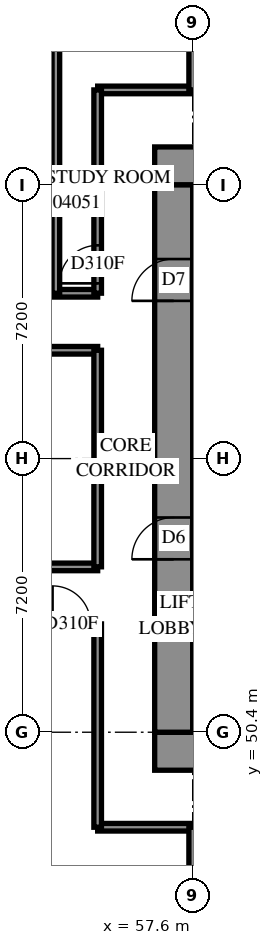
"""IFC4 building model, lengths in metres.
Left out: names, types, materials, properties, quantities, classifications, styles, units other than length and angle.
Written with IfcOpenShell. Run it as: python <this file> out.ifc"""

import sys

from ifc_helpers import new_model, si_unit, direction, frame, frame_2d, origin, place, context, subcontext, project, spatial, rectangle, extrude, element, fill, save


model = new_model("IFC4")
c1 = context("Model", 3, precision=1e-05, world=origin(), true_north=direction((0.0, 1.0)))
c2 = subcontext(c1, "Body", "Model", "MODEL_VIEW")
j1 = project(units=[si_unit("LENGTHUNIT", "METRE"), si_unit("PLANEANGLEUNIT", "RADIAN")], contexts=[c1])
p1 = place(None, origin())
s1 = spatial("IfcSite", under=j1, at=p1, CompositionType="ELEMENT")
p2 = place(p1, origin())
s2 = spatial("IfcBuilding", under=s1, at=p2, CompositionType="ELEMENT")
p3 = place(p2, frame((0.0, 0.0, 18.6)))
s3 = spatial("IfcBuildingStorey", under=s2, at=p3, CompositionType="ELEMENT", Elevation=18.6)
p4 = place(p3, frame((56.6, 49.9, -0.4), z_axis=(0.0, 0.0, 1.0), x_axis=(1.0, 0.0, 0.0)))
e1 = element("IfcWall", 1, at=p4, inside=s3, PredefinedType="SHEAR", context=c2, shape_type="SweptSolid", body=[
    extrude(rectangle(XDim=16.4, YDim=1.0, at=frame_2d((8.2, 0.0))), origin(), (0.0, 0.0, 1.0), 3.5),
])
p5 = place(p3, frame((56.6, 65.3, -0.4), z_axis=(0.0, 0.0, 1.0), x_axis=(1.0, 0.0, 0.0)))
e2 = element("IfcWall", 2, at=p5, inside=s3, PredefinedType="SHEAR", context=c2, shape_type="SweptSolid", body=[
    extrude(rectangle(XDim=16.4, YDim=1.0, at=frame_2d((8.2, 0.0))), origin(), (0.0, 0.0, 1.0), 3.5),
])
p6 = place(p5, frame((11.0, 0.0, 0.4)))
e3 = element("IfcOpeningElement", 3, at=p6, cuts=e2, PredefinedType="OPENING", context=c2, shape_type="SweptSolid", body=[
    extrude(rectangle(XDim=0.8, YDim=2.1, at=frame_2d((0.4, 1.05))), frame((0.0, 0.51, 0.0), z_axis=(0.0, -1.0, 0.0), x_axis=(1.0, 0.0, 0.0)), (0.0, 0.0, 1.0), 1.02),
])
p7 = place(p3, frame((57.1, 50.4, -0.4), z_axis=(0.0, 0.0, 1.0), x_axis=(0.0, 1.0, 0.0)))
e4 = element("IfcWall", 4, at=p7, inside=s3, PredefinedType="SHEAR", context=c2, shape_type="SweptSolid", body=[
    extrude(rectangle(XDim=14.4, YDim=1.0, at=frame_2d((7.2, 0.0))), origin(), (0.0, 0.0, 1.0), 3.5),
])
p8 = place(p7, frame((4.55, 0.0, 0.4)))
e5 = element("IfcOpeningElement", 5, at=p8, cuts=e4, PredefinedType="OPENING", context=c2, shape_type="SweptSolid", body=[
    extrude(rectangle(XDim=1.1, YDim=2.1, at=frame_2d((0.55, 1.05))), frame((0.0, 0.51, 0.0), z_axis=(0.0, -1.0, 0.0), x_axis=(1.0, 0.0, 0.0)), (0.0, 0.0, 1.0), 1.02),
])
p9 = place(p7, frame((11.35, 0.0, 0.4)))
e6 = element("IfcOpeningElement", 6, at=p9, cuts=e4, PredefinedType="OPENING", context=c2, shape_type="SweptSolid", body=[
    extrude(rectangle(XDim=1.1, YDim=2.1, at=frame_2d((0.55, 1.05))), frame((0.0, 0.51, 0.0), z_axis=(0.0, -1.0, 0.0), x_axis=(1.0, 0.0, 0.0)), (0.0, 0.0, 1.0), 1.02),
])
p10 = place(p3, frame((0.0, 53.25, 0.0), z_axis=(0.0, 0.0, 1.0), x_axis=(1.0, 0.0, 0.0)))
e7 = element("IfcWall", 7, at=p10, inside=s3, PredefinedType="PARTITIONING", context=c2, shape_type="SweptSolid", body=[
    extrude(rectangle(XDim=55.1, YDim=0.2, at=frame_2d((27.55, 0.0))), origin(), (0.0, 0.0, 1.0), 3.8),
])
p11 = place(p10, frame((8.669, 0.0, 0.0)))
e8 = element("IfcOpeningElement", 8, at=p11, cuts=e7, PredefinedType="OPENING", context=c2, shape_type="SweptSolid", body=[
    extrude(rectangle(XDim=1.0, YDim=2.1, at=frame_2d((0.5, 1.05))), frame((0.0, 0.11, 0.0), z_axis=(0.0, -1.0, 0.0), x_axis=(1.0, 0.0, 0.0)), (0.0, 0.0, 1.0), 0.22),
])
p12 = place(p10, frame((11.635, 0.0, 0.0)))
e9 = element("IfcOpeningElement", 9, at=p12, cuts=e7, PredefinedType="OPENING", context=c2, shape_type="SweptSolid", body=[
    extrude(rectangle(XDim=1.0, YDim=2.1, at=frame_2d((0.5, 1.05))), frame((0.0, 0.11, 0.0), z_axis=(0.0, -1.0, 0.0), x_axis=(1.0, 0.0, 0.0)), (0.0, 0.0, 1.0), 0.22),
])
p13 = place(p10, frame((16.165, 0.0, 0.0)))
e10 = element("IfcOpeningElement", 10, at=p13, cuts=e7, PredefinedType="OPENING", context=c2, shape_type="SweptSolid", body=[
    extrude(rectangle(XDim=1.0, YDim=2.1, at=frame_2d((0.5, 1.05))), frame((0.0, 0.11, 0.0), z_axis=(0.0, -1.0, 0.0), x_axis=(1.0, 0.0, 0.0)), (0.0, 0.0, 1.0), 0.22),
])
p14 = place(p10, frame((20.337, 0.0, 0.0)))
e11 = element("IfcOpeningElement", 11, at=p14, cuts=e7, PredefinedType="OPENING", context=c2, shape_type="SweptSolid", body=[
    extrude(rectangle(XDim=1.0, YDim=2.1, at=frame_2d((0.5, 1.05))), frame((0.0, 0.11, 0.0), z_axis=(0.0, -1.0, 0.0), x_axis=(1.0, 0.0, 0.0)), (0.0, 0.0, 1.0), 0.22),
])
p15 = place(p10, frame((27.538, 0.0, 0.0)))
e12 = element("IfcOpeningElement", 12, at=p15, cuts=e7, PredefinedType="OPENING", context=c2, shape_type="SweptSolid", body=[
    extrude(rectangle(XDim=1.0, YDim=2.1, at=frame_2d((0.5, 1.05))), frame((0.0, 0.11, 0.0), z_axis=(0.0, -1.0, 0.0), x_axis=(1.0, 0.0, 0.0)), (0.0, 0.0, 1.0), 0.22),
])
p16 = place(p10, frame((34.737, 0.0, 0.0)))
e13 = element("IfcOpeningElement", 13, at=p16, cuts=e7, PredefinedType="OPENING", context=c2, shape_type="SweptSolid", body=[
    extrude(rectangle(XDim=1.0, YDim=2.1, at=frame_2d((0.5, 1.05))), frame((0.0, 0.11, 0.0), z_axis=(0.0, -1.0, 0.0), x_axis=(1.0, 0.0, 0.0)), (0.0, 0.0, 1.0), 0.22),
])
p17 = place(p10, frame((40.125, 0.0, 0.0)))
e14 = element("IfcOpeningElement", 14, at=p17, cuts=e7, PredefinedType="OPENING", context=c2, shape_type="SweptSolid", body=[
    extrude(rectangle(XDim=1.0, YDim=2.1, at=frame_2d((0.5, 1.05))), frame((0.0, 0.11, 0.0), z_axis=(0.0, -1.0, 0.0), x_axis=(1.0, 0.0, 0.0)), (0.0, 0.0, 1.0), 0.22),
])
p18 = place(p10, frame((46.758, 0.0, 0.0)))
e15 = element("IfcOpeningElement", 15, at=p18, cuts=e7, PredefinedType="OPENING", context=c2, shape_type="SweptSolid", body=[
    extrude(rectangle(XDim=1.0, YDim=2.1, at=frame_2d((0.5, 1.05))), frame((0.0, 0.11, 0.0), z_axis=(0.0, -1.0, 0.0), x_axis=(1.0, 0.0, 0.0)), (0.0, 0.0, 1.0), 0.22),
])
p19 = place(p10, frame((53.913, 0.0, 0.0)))
e16 = element("IfcOpeningElement", 16, at=p19, cuts=e7, PredefinedType="OPENING", context=c2, shape_type="SweptSolid", body=[
    extrude(rectangle(XDim=1.0, YDim=2.1, at=frame_2d((0.5, 1.05))), frame((0.0, 0.11, 0.0), z_axis=(0.0, -1.0, 0.0), x_axis=(1.0, 0.0, 0.0)), (0.0, 0.0, 1.0), 0.22),
])
p20 = place(p10, frame((2.672, 0.0, 0.0)))
e17 = element("IfcOpeningElement", 17, at=p20, cuts=e7, PredefinedType="OPENING", context=c2, shape_type="SweptSolid", body=[
    extrude(rectangle(XDim=1.0, YDim=2.1, at=frame_2d((0.5, 1.05))), frame((0.0, 0.11, 0.0), z_axis=(0.0, -1.0, 0.0), x_axis=(1.0, 0.0, 0.0)), (0.0, 0.0, 1.0), 0.22),
])
p21 = place(p10, frame((4.788, 0.0, 0.0)))
e18 = element("IfcOpeningElement", 18, at=p21, cuts=e7, PredefinedType="OPENING", context=c2, shape_type="SweptSolid", body=[
    extrude(rectangle(XDim=1.0, YDim=2.1, at=frame_2d((0.5, 1.05))), frame((0.0, 0.11, 0.0), z_axis=(0.0, -1.0, 0.0), x_axis=(1.0, 0.0, 0.0)), (0.0, 0.0, 1.0), 0.22),
])
p22 = place(p3, frame((0.002, 60.45, 0.0), z_axis=(0.0, 0.0, 1.0), x_axis=(1.0, 0.0, 0.0)))
e19 = element("IfcWall", 19, at=p22, inside=s3, PredefinedType="PARTITIONING", context=c2, shape_type="SweptSolid", body=[
    extrude(rectangle(XDim=55.098, YDim=0.2, at=frame_2d((27.549, 0.0))), origin(), (0.0, 0.0, 1.0), 3.8),
])
p23 = place(p22, frame((49.69, 0.0, 0.0)))
e20 = element("IfcOpeningElement", 20, at=p23, cuts=e19, PredefinedType="OPENING", context=c2, shape_type="SweptSolid", body=[
    extrude(rectangle(XDim=1.0, YDim=2.1, at=frame_2d((0.5, 1.05))), frame((0.0, 0.11, 0.0), z_axis=(0.0, -1.0, 0.0), x_axis=(1.0, 0.0, 0.0)), (0.0, 0.0, 1.0), 0.22),
])
p24 = place(p22, frame((3.897, 0.0, 0.0)))
e21 = element("IfcOpeningElement", 21, at=p24, cuts=e19, PredefinedType="OPENING", context=c2, shape_type="SweptSolid", body=[
    extrude(rectangle(XDim=1.0, YDim=2.1, at=frame_2d((0.5, 1.05))), frame((0.0, 0.11, 0.0), z_axis=(0.0, -1.0, 0.0), x_axis=(1.0, 0.0, 0.0)), (0.0, 0.0, 1.0), 0.22),
])
p25 = place(p3, frame((0.002, 61.95, 0.0), z_axis=(0.0, 0.0, 1.0), x_axis=(1.0, 0.0, 0.0)))
e22 = element("IfcWall", 22, at=p25, inside=s3, PredefinedType="PARTITIONING", context=c2, shape_type="SweptSolid", body=[
    extrude(rectangle(XDim=55.098, YDim=0.2, at=frame_2d((27.549, 0.0))), origin(), (0.0, 0.0, 1.0), 3.8),
])
p26 = place(p25, frame((8.667, 0.0, 0.0)))
e23 = element("IfcOpeningElement", 23, at=p26, cuts=e22, PredefinedType="OPENING", context=c2, shape_type="SweptSolid", body=[
    extrude(rectangle(XDim=1.0, YDim=2.1, at=frame_2d((0.5, 1.05))), frame((0.0, 0.11, 0.0), z_axis=(0.0, -1.0, 0.0), x_axis=(1.0, 0.0, 0.0)), (0.0, 0.0, 1.0), 0.22),
])
p27 = place(p25, frame((13.136, 0.0, 0.0)))
e24 = element("IfcOpeningElement", 24, at=p27, cuts=e22, PredefinedType="OPENING", context=c2, shape_type="SweptSolid", body=[
    extrude(rectangle(XDim=1.0, YDim=2.1, at=frame_2d((0.5, 1.05))), frame((0.0, 0.11, 0.0), z_axis=(0.0, -1.0, 0.0), x_axis=(1.0, 0.0, 0.0)), (0.0, 0.0, 1.0), 0.22),
])
p28 = place(p25, frame((20.335, 0.0, 0.0)))
e25 = element("IfcOpeningElement", 25, at=p28, cuts=e22, PredefinedType="OPENING", context=c2, shape_type="SweptSolid", body=[
    extrude(rectangle(XDim=1.0, YDim=2.1, at=frame_2d((0.5, 1.05))), frame((0.0, 0.11, 0.0), z_axis=(0.0, -1.0, 0.0), x_axis=(1.0, 0.0, 0.0)), (0.0, 0.0, 1.0), 0.22),
])
p29 = place(p25, frame((27.535, 0.0, 0.0)))
e26 = element("IfcOpeningElement", 26, at=p29, cuts=e22, PredefinedType="OPENING", context=c2, shape_type="SweptSolid", body=[
    extrude(rectangle(XDim=1.0, YDim=2.1, at=frame_2d((0.5, 1.05))), frame((0.0, 0.11, 0.0), z_axis=(0.0, -1.0, 0.0), x_axis=(1.0, 0.0, 0.0)), (0.0, 0.0, 1.0), 0.22),
])
p30 = place(p25, frame((34.736, 0.0, 0.0)))
e27 = element("IfcOpeningElement", 27, at=p30, cuts=e22, PredefinedType="OPENING", context=c2, shape_type="SweptSolid", body=[
    extrude(rectangle(XDim=1.0, YDim=2.1, at=frame_2d((0.5, 1.05))), frame((0.0, 0.11, 0.0), z_axis=(0.0, -1.0, 0.0), x_axis=(1.0, 0.0, 0.0)), (0.0, 0.0, 1.0), 0.22),
])
p31 = place(p25, frame((41.935, 0.0, 0.0)))
e28 = element("IfcOpeningElement", 28, at=p31, cuts=e22, PredefinedType="OPENING", context=c2, shape_type="SweptSolid", body=[
    extrude(rectangle(XDim=1.0, YDim=2.1, at=frame_2d((0.5, 1.05))), frame((0.0, 0.11, 0.0), z_axis=(0.0, -1.0, 0.0), x_axis=(1.0, 0.0, 0.0)), (0.0, 0.0, 1.0), 0.22),
])
p32 = place(p25, frame((49.136, 0.0, 0.0)))
e29 = element("IfcOpeningElement", 29, at=p32, cuts=e22, PredefinedType="OPENING", context=c2, shape_type="SweptSolid", body=[
    extrude(rectangle(XDim=1.0, YDim=2.1, at=frame_2d((0.5, 1.05))), frame((0.0, 0.11, 0.0), z_axis=(0.0, -1.0, 0.0), x_axis=(1.0, 0.0, 0.0)), (0.0, 0.0, 1.0), 0.22),
])
p33 = place(p25, frame((4.799, 0.0, 0.0)))
e30 = element("IfcOpeningElement", 30, at=p33, cuts=e22, PredefinedType="OPENING", context=c2, shape_type="SweptSolid", body=[
    extrude(rectangle(XDim=1.0, YDim=2.1, at=frame_2d((0.5, 1.05))), frame((0.0, 0.11, 0.0), z_axis=(0.0, -1.0, 0.0), x_axis=(1.0, 0.0, 0.0)), (0.0, 0.0, 1.0), 0.22),
])
p34 = place(p3, frame((6.0, 54.75, 0.0), z_axis=(0.0, 0.0, 1.0), x_axis=(1.0, 0.0, 0.0)))
e31 = element("IfcWall", 31, at=p34, inside=s3, PredefinedType="PARTITIONING", context=c2, shape_type="SweptSolid", body=[
    extrude(rectangle(XDim=49.1, YDim=0.2, at=frame_2d((24.55, 0.0))), origin(), (0.0, 0.0, 1.0), 3.8),
])
p35 = place(p34, frame((6.284, 0.0, 0.0)))
e32 = element("IfcOpeningElement", 32, at=p35, cuts=e31, PredefinedType="OPENING", context=c2, shape_type="SweptSolid", body=[
    extrude(rectangle(XDim=1.0, YDim=2.1, at=frame_2d((0.5, 1.05))), frame((0.0, 0.11, 0.0), z_axis=(0.0, -1.0, 0.0), x_axis=(1.0, 0.0, 0.0)), (0.0, 0.0, 1.0), 0.22),
])
p36 = place(p34, frame((14.374, 0.0, 0.0)))
e33 = element("IfcOpeningElement", 33, at=p36, cuts=e31, PredefinedType="OPENING", context=c2, shape_type="SweptSolid", body=[
    extrude(rectangle(XDim=1.0, YDim=2.1, at=frame_2d((0.5, 1.05))), frame((0.0, 0.11, 0.0), z_axis=(0.0, -1.0, 0.0), x_axis=(1.0, 0.0, 0.0)), (0.0, 0.0, 1.0), 0.22),
])
p37 = place(p34, frame((19.725, 0.0, 0.0)))
e34 = element("IfcOpeningElement", 34, at=p37, cuts=e31, PredefinedType="OPENING", context=c2, shape_type="SweptSolid", body=[
    extrude(rectangle(XDim=1.0, YDim=2.1, at=frame_2d((0.5, 1.05))), frame((0.0, 0.11, 0.0), z_axis=(0.0, -1.0, 0.0), x_axis=(1.0, 0.0, 0.0)), (0.0, 0.0, 1.0), 0.22),
])
p38 = place(p34, frame((28.183, 0.0, 0.0)))
e35 = element("IfcOpeningElement", 35, at=p38, cuts=e31, PredefinedType="OPENING", context=c2, shape_type="SweptSolid", body=[
    extrude(rectangle(XDim=1.0, YDim=2.1, at=frame_2d((0.5, 1.05))), frame((0.0, 0.11, 0.0), z_axis=(0.0, -1.0, 0.0), x_axis=(1.0, 0.0, 0.0)), (0.0, 0.0, 1.0), 0.22),
])
p39 = place(p34, frame((35.974, 0.0, 0.0)))
e36 = element("IfcOpeningElement", 36, at=p39, cuts=e31, PredefinedType="OPENING", context=c2, shape_type="SweptSolid", body=[
    extrude(rectangle(XDim=1.0, YDim=2.1, at=frame_2d((0.5, 1.05))), frame((0.0, 0.11, 0.0), z_axis=(0.0, -1.0, 0.0), x_axis=(1.0, 0.0, 0.0)), (0.0, 0.0, 1.0), 0.22),
])
p40 = place(p3, frame((55.1, 67.3, 0.0), z_axis=(0.0, 0.0, 1.0), x_axis=(1.0, 0.0, 0.0)))
e37 = element("IfcWall", 37, at=p40, inside=s3, PredefinedType="PARTITIONING", context=c2, shape_type="SweptSolid", body=[
    extrude(rectangle(XDim=19.4, YDim=0.2, at=frame_2d((9.7, 0.0))), origin(), (0.0, 0.0, 1.0), 3.8),
])
p41 = place(p40, frame((6.058, 0.0, 0.0)))
e38 = element("IfcOpeningElement", 38, at=p41, cuts=e37, PredefinedType="OPENING", context=c2, shape_type="SweptSolid", body=[
    extrude(rectangle(XDim=1.0, YDim=2.1, at=frame_2d((0.5, 1.05))), frame((0.0, 0.11, 0.0), z_axis=(0.0, -1.0, 0.0), x_axis=(1.0, 0.0, 0.0)), (0.0, 0.0, 1.0), 0.22),
])
p42 = place(p40, frame((13.562, 0.0, 0.0)))
e39 = element("IfcOpeningElement", 39, at=p42, cuts=e37, PredefinedType="OPENING", context=c2, shape_type="SweptSolid", body=[
    extrude(rectangle(XDim=1.0, YDim=2.1, at=frame_2d((0.5, 1.05))), frame((0.0, 0.11, 0.0), z_axis=(0.0, -1.0, 0.0), x_axis=(1.0, 0.0, 0.0)), (0.0, 0.0, 1.0), 0.22),
])
p43 = place(p3, frame((55.1, 47.9, 0.0), z_axis=(0.0, 0.0, 1.0), x_axis=(1.0, 0.0, 0.0)))
e40 = element("IfcWall", 40, at=p43, inside=s3, PredefinedType="PARTITIONING", context=c2, shape_type="SweptSolid", body=[
    extrude(rectangle(XDim=19.208, YDim=0.2, at=frame_2d((9.604, 0.0))), origin(), (0.0, 0.0, 1.0), 3.8),
])
p44 = place(p43, frame((6.058, 0.0, 0.0)))
e41 = element("IfcOpeningElement", 41, at=p44, cuts=e40, PredefinedType="OPENING", context=c2, shape_type="SweptSolid", body=[
    extrude(rectangle(XDim=1.0, YDim=2.1, at=frame_2d((0.5, 1.05))), frame((0.0, 0.11, 0.0), z_axis=(0.0, -1.0, 0.0), x_axis=(1.0, 0.0, 0.0)), (0.0, 0.0, 1.0), 0.22),
])
p45 = place(p43, frame((13.258, 0.0, 0.0)))
e42 = element("IfcOpeningElement", 42, at=p45, cuts=e40, PredefinedType="OPENING", context=c2, shape_type="SweptSolid", body=[
    extrude(rectangle(XDim=1.0, YDim=2.1, at=frame_2d((0.5, 1.05))), frame((0.0, 0.11, 0.0), z_axis=(0.0, -1.0, 0.0), x_axis=(1.0, 0.0, 0.0)), (0.0, 0.0, 1.0), 0.22),
])
p46 = place(p3, frame((54.0, 61.95, 0.0), z_axis=(0.0, 0.0, 1.0), x_axis=(0.0, 1.0, 0.0)))
e43 = element("IfcWall", 43, at=p46, inside=s3, PredefinedType="PARTITIONING", context=c2, shape_type="SweptSolid", body=[
    extrude(rectangle(XDim=10.7, YDim=0.2, at=frame_2d((5.35, 0.0))), origin(), (0.0, 0.0, 1.0), 3.8),
])
p47 = place(p3, frame((55.1, 54.752, 0.0), z_axis=(0.0, 0.0, 1.0), x_axis=(0.0, 1.0, 0.0)))
e44 = element("IfcWall", 44, at=p47, inside=s3, PredefinedType="PARTITIONING", context=c2, shape_type="SweptSolid", body=[
    extrude(rectangle(XDim=5.698, YDim=0.2, at=frame_2d((2.849, 0.0))), origin(), (0.0, 0.0, 1.0), 3.8),
])
p48 = place(p3, frame((55.1, 47.9, 0.0), z_axis=(0.0, 0.0, 1.0), x_axis=(0.0, 1.0, 0.0)))
e45 = element("IfcWall", 45, at=p48, inside=s3, PredefinedType="PARTITIONING", context=c2, shape_type="SweptSolid", body=[
    extrude(rectangle(XDim=5.35, YDim=0.2, at=frame_2d((2.675, 0.0))), origin(), (0.0, 0.0, 1.0), 3.8),
])
p49 = place(p3, frame((55.1, 61.952, 0.0), z_axis=(0.0, 0.0, 1.0), x_axis=(0.0, 1.0, 0.0)))
e46 = element("IfcWall", 46, at=p49, inside=s3, PredefinedType="PARTITIONING", context=c2, shape_type="SweptSolid", body=[
    extrude(rectangle(XDim=5.348, YDim=0.2, at=frame_2d((2.674, 0.0))), origin(), (0.0, 0.0, 1.0), 3.8),
])
p50 = place(p49, frame((0.259, 0.0, 0.0)))
e47 = element("IfcOpeningElement", 47, at=p50, cuts=e46, PredefinedType="OPENING", context=c2, shape_type="SweptSolid", body=[
    extrude(rectangle(XDim=1.0, YDim=2.1, at=frame_2d((0.5, 1.05))), frame((0.0, 0.11, 0.0), z_axis=(0.0, -1.0, 0.0), x_axis=(1.0, 0.0, 0.0)), (0.0, 0.0, 1.0), 0.22),
])
p51 = place(p3, frame((57.6, 67.3, 0.0), z_axis=(0.0, 0.0, 1.0), x_axis=(0.0, 1.0, 0.0)))
e48 = element("IfcWall", 48, at=p51, inside=s3, PredefinedType="PARTITIONING", context=c2, shape_type="SweptSolid", body=[
    extrude(rectangle(XDim=3.996, YDim=0.2, at=frame_2d((1.998, 0.0))), origin(), (0.0, 0.0, 1.0), 3.8),
])
p52 = place(p3, frame((57.6, 43.906, 0.0), z_axis=(0.0, 0.0, 1.0), x_axis=(0.0, 1.0, 0.0)))
e49 = element("IfcWall", 49, at=p52, inside=s3, PredefinedType="PARTITIONING", context=c2, shape_type="SweptSolid", body=[
    extrude(rectangle(XDim=3.994, YDim=0.2, at=frame_2d((1.997, 0.0))), origin(), (0.0, 0.0, 1.0), 3.8),
])
p53 = place(p8, origin())
e50 = element("IfcDoor", 50, at=p53, inside=s3, OperationType="DOUBLE_DOOR_SINGLE_SWING", PredefinedType="DOOR", context=c2, shape_type="SweptSolid", body=[
    extrude(rectangle(XDim=1.1, YDim=2.1, at=frame_2d((0.55, 1.05))), frame((0.0, 0.025, 0.0), z_axis=(0.0, -1.0, 0.0), x_axis=(1.0, 0.0, 0.0)), (0.0, 0.0, 1.0), 0.05),
])
fill(e5, e50)
p54 = place(p9, origin())
e51 = element("IfcDoor", 51, at=p54, inside=s3, OperationType="SINGLE_SWING_LEFT", PredefinedType="DOOR", context=c2, shape_type="SweptSolid", body=[
    extrude(rectangle(XDim=1.1, YDim=2.1, at=frame_2d((0.55, 1.05))), frame((0.0, 0.025, 0.0), z_axis=(0.0, -1.0, 0.0), x_axis=(1.0, 0.0, 0.0)), (0.0, 0.0, 1.0), 0.05),
])
fill(e6, e51)
p55 = place(p19, origin())
e52 = element("IfcDoor", 52, at=p55, inside=s3, OperationType="SINGLE_SWING_LEFT", PredefinedType="DOOR", context=c2, shape_type="SweptSolid", body=[
    extrude(rectangle(XDim=1.0, YDim=2.1, at=frame_2d((0.5, 1.05))), frame((0.0, 0.025, 0.0), z_axis=(0.0, -1.0, 0.0), x_axis=(1.0, 0.0, 0.0)), (0.0, 0.0, 1.0), 0.05),
])
fill(e16, e52)
p56 = place(p50, origin())
e53 = element("IfcDoor", 53, at=p56, inside=s3, OperationType="SINGLE_SWING_LEFT", PredefinedType="DOOR", context=c2, shape_type="SweptSolid", body=[
    extrude(rectangle(XDim=1.0, YDim=2.1, at=frame_2d((0.5, 1.05))), frame((0.0, 0.025, 0.0), z_axis=(0.0, -1.0, 0.0), x_axis=(1.0, 0.0, 0.0)), (0.0, 0.0, 1.0), 0.05),
])
fill(e47, e53)
save(model, sys.argv[1])
